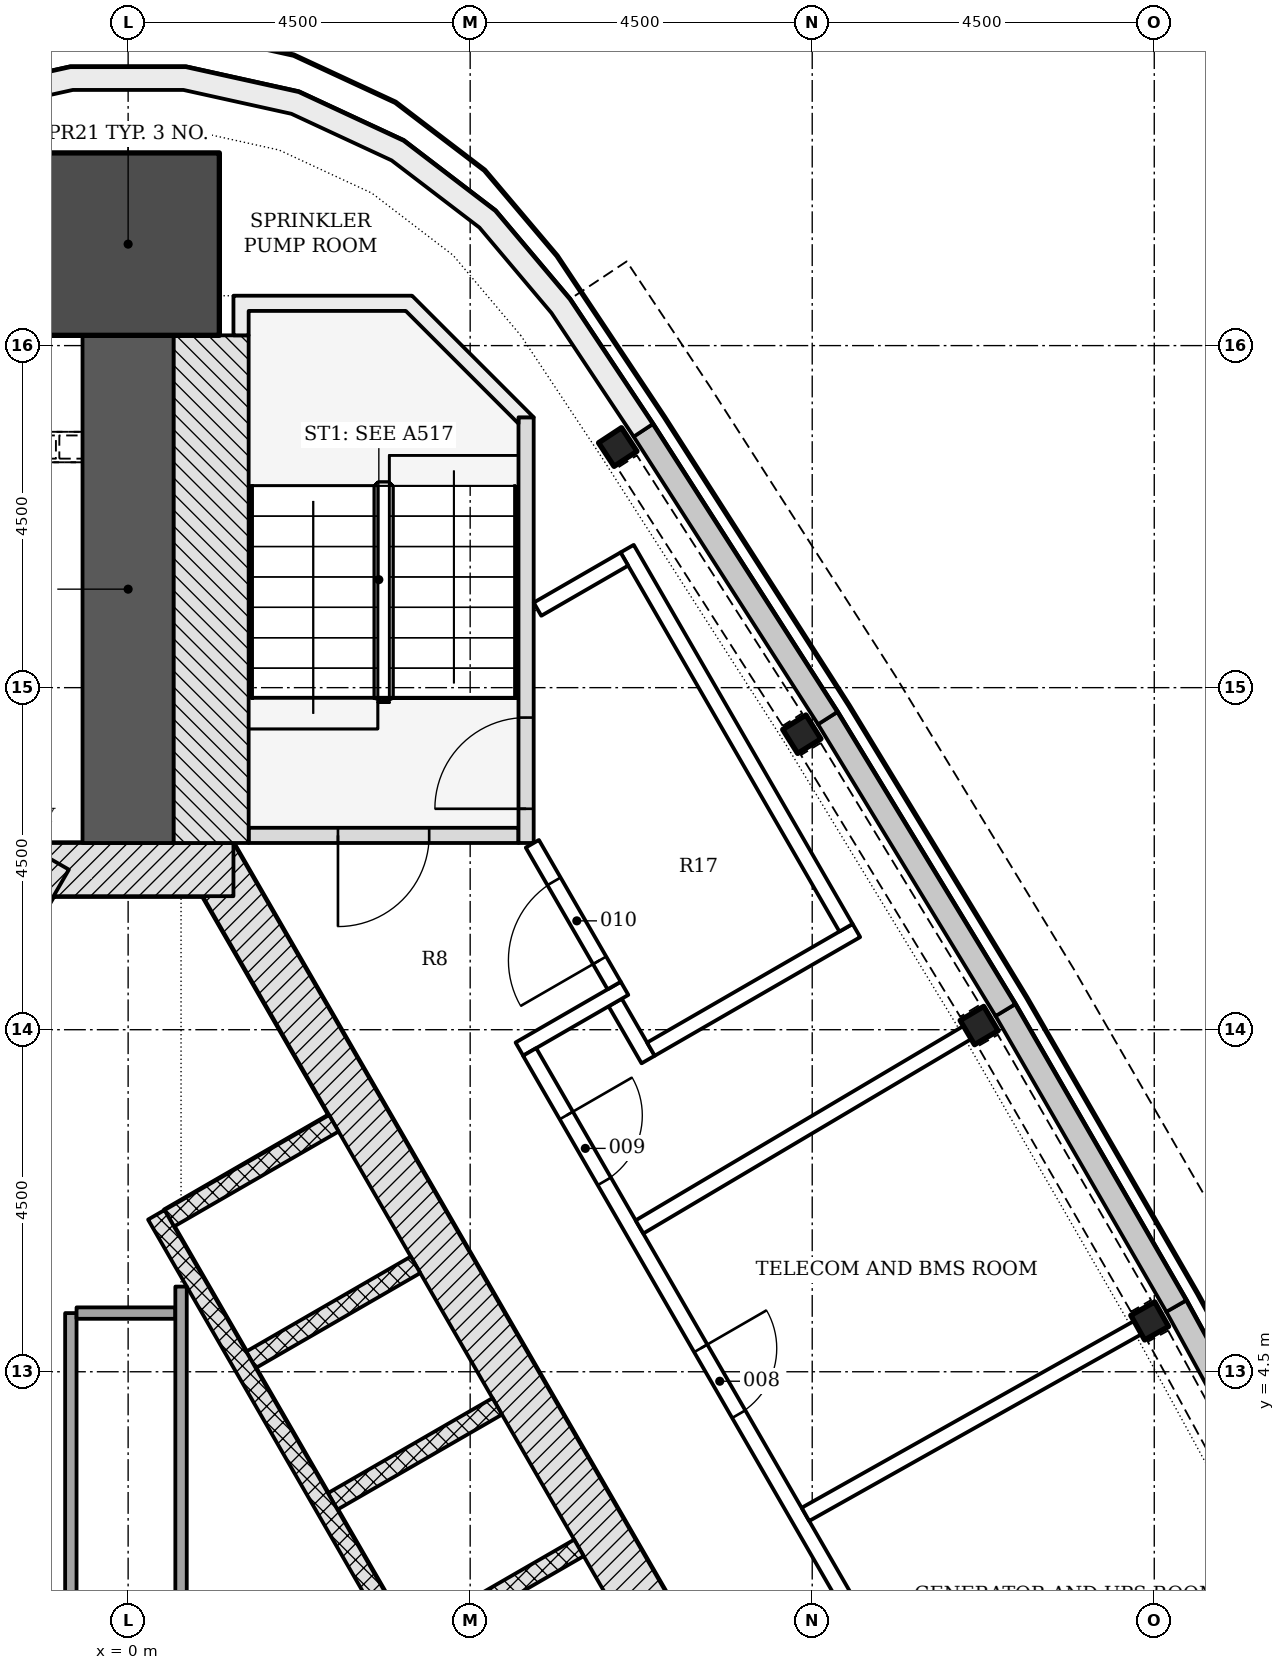
"""IFC4 building model, lengths in metres.
Left out: names, types, materials, properties, quantities, classifications, styles, units other than length and angle.
Written with IfcOpenShell. Run it as: python <this file> out.ifc"""

import sys

from ifc_helpers import new_model, si_unit, direction, frame, frame_2d, origin, origin_2d, place, context, subcontext, project, spatial, polyline, rectangle, i_section, outline, extrude, element, fill, save


model = new_model("IFC4")
c1 = context("Model", 3, precision=1e-05, world=origin(), true_north=direction((0.0, 1.0)))
c2 = subcontext(c1, "Body", "Model", "MODEL_VIEW")
j1 = project(units=[si_unit("LENGTHUNIT", "METRE"), si_unit("PLANEANGLEUNIT", "RADIAN")], contexts=[c1])
p1 = place(None, origin())
s1 = spatial("IfcSite", under=j1, at=p1, CompositionType="ELEMENT")
p2 = place(p1, origin())
s2 = spatial("IfcBuilding", under=s1, at=p2, CompositionType="ELEMENT")
p3 = place(p2, frame((0.0, 0.0, 258.0)))
s3 = spatial("IfcBuildingStorey", under=s2, at=p3, CompositionType="ELEMENT", Elevation=258.0)
p4 = place(p3, frame((10.311, -4.703, -0.3), z_axis=(0.0, 0.0, 1.0), x_axis=(-0.500001446645, 0.866024568562, 0.0)))
e1 = element("IfcWall", 1, at=p4, inside=s3, PredefinedType="SHEAR", context=c2, shape_type="SweptSolid", body=[
    extrude(rectangle(XDim=18.458, YDim=0.7, at=frame_2d((9.229, 0.0))), origin(), (0.0, 0.0, 1.0), 5.5),
])
p5 = place(p3, frame((1.386, 11.106, -0.3), z_axis=(0.0, 0.0, 1.0), x_axis=(-1.0, 0.0, 0.0)))
e2 = element("IfcWall", 2, at=p5, inside=s3, PredefinedType="SHEAR", context=c2, shape_type="SweptSolid", body=[
    extrude(rectangle(XDim=2.771, YDim=0.7, at=frame_2d((1.386, 0.0))), origin(), (0.0, 0.0, 1.0), 5.5),
])
p6 = place(p3, frame((-1.083, 11.281, -0.3), z_axis=(0.0, 0.0, 1.0), x_axis=(-0.500001446645, -0.866024568562, 0.0)))
e3 = element("IfcWall", 3, at=p6, inside=s3, PredefinedType="SHEAR", context=c2, shape_type="SweptSolid", body=[
    extrude(rectangle(XDim=18.458, YDim=0.7, at=frame_2d((9.229, 0.0))), origin(), (0.0, 0.0, 1.0), 5.5),
])
p7 = place(p6, frame((8.979, 0.0, 0.3)))
e4 = element("IfcOpeningElement", 4, at=p7, cuts=e3, PredefinedType="OPENING", context=c2, shape_type="SweptSolid", body=[
    extrude(rectangle(XDim=1.2, YDim=2.1, at=frame_2d((0.6, 1.05))), frame((0.0, 0.36, 0.0), z_axis=(0.0, -1.0, 0.0), x_axis=(1.0, 0.0, 0.0)), (0.0, 0.0, 1.0), 0.72),
])
p8 = place(p6, frame((11.029, 0.0, 0.3)))
e5 = element("IfcOpeningElement", 5, at=p8, cuts=e3, PredefinedType="OPENING", context=c2, shape_type="SweptSolid", body=[
    extrude(rectangle(XDim=1.2, YDim=2.1, at=frame_2d((0.6, 1.05))), frame((0.0, 0.36, 0.0), z_axis=(0.0, -1.0, 0.0), x_axis=(1.0, 0.0, 0.0)), (0.0, 0.0, 1.0), 0.72),
])
p9 = place(p3, frame((0.0, 11.456, -0.3), z_axis=(0.0, 0.0, 1.0), x_axis=(0.0, 1.0, 0.0)))
e6 = element("IfcWall", 6, at=p9, inside=s3, PredefinedType="SHEAR", context=c2, shape_type="SweptSolid", body=[
    extrude(rectangle(XDim=6.679, YDim=1.2, at=frame_2d((3.339, 0.0))), origin(), (0.0, 0.0, 1.0), 5.5),
])
p10 = place(p3, frame((0.0, 19.335, -0.3), z_axis=(0.0, 0.0, 1.0), x_axis=(0.0, 1.0, 0.0)))
e7 = element("IfcColumn", 7, at=p10, inside=s3, PredefinedType="COLUMN", context=c2, shape_type="SweptSolid", body=[
    extrude(rectangle(XDim=2.4, YDim=2.4, at=origin_2d()), origin(), (0.0, 0.0, 1.0), 5.5),
])
for number, where, z_axis, x_axis in (
    (8, (13.44, 5.169, -0.3), (0.0, 0.0, 1.0), (-0.49, 0.872, 0.0)),
    (9, (11.196, 9.055, -0.3), (0.0, 0.0, 1.0), (-0.51, 0.86, 0.0)),
    (10, (8.863, 12.888, -0.3), (0.0, 0.0, 1.0), (-0.53, 0.848, 0.0)),
    (11, (6.442, 16.666, -0.3), (0.0, 0.0, 1.0), (-0.549, 0.836, 0.0)),
):
    element("IfcColumn", number, at=place(p3, frame(where, z_axis=z_axis, x_axis=x_axis)), inside=s3, PredefinedType="COLUMN", context=c2, shape_type="SweptSolid", body=[
        extrude(i_section(OverallWidth=0.371, OverallDepth=0.361, WebThickness=0.012, FlangeThickness=0.02, FilletRadius=0.015, at=origin_2d()), origin(), (0.0, 0.0, 1.0), 5.5),
    ])
p11 = place(p3, origin())
e12 = element("IfcWall", 12, at=p11, inside=s3, PredefinedType="NOTDEFINED", context=c2, shape_type="SweptSolid", body=[
    extrude(outline(polyline([(16.078, 1.49), (13.919, 5.438), (13.656, 5.294), (15.815, 1.346), (16.078, 1.49)])), origin(), (0.0, 0.0, 1.0), 1.2),
])
p12 = place(p3, origin())
e13 = element("IfcWall", 13, at=p12, inside=s3, PredefinedType="NOTDEFINED", context=c2, shape_type="SweptSolid", body=[
    extrude(outline(polyline([(13.919, 5.438), (11.669, 9.335), (11.409, 9.185), (13.659, 5.288), (13.919, 5.438)])), origin(), (0.0, 0.0, 1.0), 1.2),
])
p13 = place(p3, origin())
e14 = element("IfcWall", 14, at=p13, inside=s3, PredefinedType="NOTDEFINED", context=c2, shape_type="SweptSolid", body=[
    extrude(outline(polyline([(11.669, 9.335), (9.33, 13.179), (9.073, 13.023), (11.413, 9.179), (11.669, 9.335)])), origin(), (0.0, 0.0, 1.0), 1.2),
])
p14 = place(p3, origin())
e15 = element("IfcWall", 15, at=p14, inside=s3, PredefinedType="NOTDEFINED", context=c2, shape_type="SweptSolid", body=[
    extrude(outline(polyline([(9.33, 13.179), (6.901, 16.968), (6.649, 16.806), (9.077, 13.017), (9.33, 13.179)])), origin(), (0.0, 0.0, 1.0), 1.2),
])
p15 = place(p3, origin())
e16 = element("IfcWall", 16, at=p15, inside=s3, PredefinedType="NOTDEFINED", context=c2, shape_type="SweptSolid", body=[
    extrude(outline(polyline([(6.901, 16.968), (5.81, 18.61), (4.83, 19.771), (3.623, 20.695), (2.244, 21.335), (0.76, 21.664), (-0.76, 21.664), (-2.244, 21.335), (-3.623, 20.695), (-4.83, 19.771), (-5.81, 18.61), (-5.58, 18.416), (-4.622, 19.553), (-3.466, 20.437), (-2.147, 21.05), (-0.727, 21.364), (0.727, 21.364), (2.147, 21.05), (3.466, 20.437), (4.622, 19.553), (5.569, 18.429), (6.651, 16.802), (6.901, 16.968)])), origin(), (0.0, 0.0, 1.0), 5.2),
])
p16 = place(p3, frame((5.931, 2.183, -0.3), z_axis=(0.0, 0.0, 1.0), x_axis=(-0.866047370643, -0.499961950354, 0.0)))
e17 = element("IfcWall", 17, at=p16, inside=s3, PredefinedType="PARTITIONING", context=c2, shape_type="SweptSolid", body=[
    extrude(rectangle(XDim=2.5, YDim=0.25, at=frame_2d((1.25, 0.0))), origin(), (0.0, 0.0, 1.0), 5.5),
])
for number, where, z_axis, x_axis in (
    (18, (4.856, 4.045, -0.3), (0.0, 0.0, 1.0), (-0.866, -0.5, 0.0)),
    (19, (3.781, 5.907, -0.3), (0.0, 0.0, 1.0), (-0.866, -0.5, 0.0)),
    (20, (2.706, 7.769, -0.3), (0.0, 0.0, 1.0), (-0.866, -0.5, 0.0)),
):
    element("IfcWall", number, at=place(p3, frame(where, z_axis=z_axis, x_axis=x_axis)), inside=s3, PredefinedType="PARTITIONING", context=c2, shape_type="SweptSolid", body=[
        extrude(rectangle(XDim=2.5, YDim=0.25, at=frame_2d((1.25, 0.0))), origin(), (0.0, 0.0, 1.0), 5.5),
    ])
p17 = place(p3, frame((5.87, -2.961, 0.0), z_axis=(0.0, 0.0, 1.0), x_axis=(-0.50000615651, 0.866021849293, 0.0)))
e21 = element("IfcWall", 21, at=p17, inside=s3, PredefinedType="PARTITIONING", context=c2, shape_type="SweptSolid", body=[
    extrude(rectangle(XDim=11.0, YDim=0.25, at=frame_2d((5.5, 0.0))), origin(), (0.0, 0.0, 1.0), 5.2),
])
p18 = place(p3, frame((-0.754, 5.272, 0.0), z_axis=(0.0, 0.0, 1.0), x_axis=(0.0, -1.0, 0.0)))
e22 = element("IfcWall", 22, at=p18, inside=s3, PredefinedType="PARTITIONING", context=c2, shape_type="SweptSolid", body=[
    extrude(rectangle(XDim=11.5, YDim=0.15, at=frame_2d((5.75, 0.0))), origin(), (0.0, 0.0, 1.0), 5.2),
])
p19 = place(p18, frame((3.701, 0.0, 0.0)))
e23 = element("IfcOpeningElement", 23, at=p19, cuts=e22, PredefinedType="OPENING", context=c2, shape_type="SweptSolid", body=[
    extrude(rectangle(XDim=0.9, YDim=2.1, at=frame_2d((0.45, 1.05))), frame((0.0, 0.085, 0.0), z_axis=(0.0, -1.0, 0.0), x_axis=(1.0, 0.0, 0.0)), (0.0, 0.0, 1.0), 0.17),
])
p20 = place(p3, frame((-0.679, 5.272, 0.0), z_axis=(0.0, 0.0, 1.0), x_axis=(1.0, 0.0, 0.0)))
e24 = element("IfcWall", 24, at=p20, inside=s3, PredefinedType="PARTITIONING", context=c2, shape_type="SweptSolid", body=[
    extrude(rectangle(XDim=1.3, YDim=0.15, at=frame_2d((0.65, 0.0))), origin(), (0.0, 0.0, 1.0), 5.2),
])
p21 = place(p3, frame((0.696, -5.928, 0.0), z_axis=(0.0, 0.0, 1.0), x_axis=(0.0, 1.0, 0.0)))
e25 = element("IfcWall", 25, at=p21, inside=s3, PredefinedType="PARTITIONING", context=c2, shape_type="SweptSolid", body=[
    extrude(rectangle(XDim=11.549, YDim=0.15, at=frame_2d((5.774, 0.0))), origin(), (0.0, 0.0, 1.0), 5.2),
])
p22 = place(p21, frame((6.6, 0.0, 0.0)))
e26 = element("IfcOpeningElement", 26, at=p22, cuts=e25, PredefinedType="OPENING", context=c2, shape_type="SweptSolid", body=[
    extrude(rectangle(XDim=0.9, YDim=2.1, at=frame_2d((0.45, 1.05))), frame((0.0, 0.085, 0.0), z_axis=(0.0, -1.0, 0.0), x_axis=(1.0, 0.0, 0.0)), (0.0, 0.0, 1.0), 0.17),
])
p23 = place(p3, frame((5.135, 11.556, -0.3), z_axis=(0.0, 0.0, 1.0), x_axis=(-1.0, 0.0, 0.0)))
e27 = element("IfcWall", 27, at=p23, inside=s3, PredefinedType="SHEAR", context=c2, shape_type="SweptSolid", body=[
    extrude(rectangle(XDim=3.55, YDim=0.2, at=frame_2d((1.775, 0.0))), origin(), (0.0, 0.0, 1.0), 5.5),
])
p24 = place(p23, frame((1.175, 0.0, 0.3)))
e28 = element("IfcOpeningElement", 28, at=p24, cuts=e27, PredefinedType="OPENING", context=c2, shape_type="SweptSolid", body=[
    extrude(rectangle(XDim=1.2, YDim=2.1, at=frame_2d((0.6, 1.05))), frame((0.0, 0.11, 0.0), z_axis=(0.0, -1.0, 0.0), x_axis=(1.0, 0.0, 0.0)), (0.0, 0.0, 1.0), 0.22),
])
p25 = place(p3, frame((5.236, 11.456, -0.3), z_axis=(0.0, 0.0, 1.0), x_axis=(0.0, 1.0, 0.0)))
e29 = element("IfcWall", 29, at=p25, inside=s3, PredefinedType="SHEAR", context=c2, shape_type="SweptSolid", body=[
    extrude(rectangle(XDim=5.6, YDim=0.2, at=frame_2d((2.8, 0.0))), origin(), (0.0, 0.0, 1.0), 5.5),
])
p26 = place(p25, frame((0.45, 0.0, 0.3)))
e30 = element("IfcOpeningElement", 30, at=p26, cuts=e29, PredefinedType="OPENING", context=c2, shape_type="SweptSolid", body=[
    extrude(rectangle(XDim=1.2, YDim=2.1, at=frame_2d((0.6, 1.05))), frame((0.0, 0.11, 0.0), z_axis=(0.0, -1.0, 0.0), x_axis=(1.0, 0.0, 0.0)), (0.0, 0.0, 1.0), 0.22),
])
p27 = place(p3, frame((1.093, 11.456, -0.3), z_axis=(0.0, 0.0, 1.0), x_axis=(0.0, 1.0, 0.0)))
e31 = element("IfcWall", 31, at=p27, inside=s3, PredefinedType="SHEAR", context=c2, shape_type="SweptSolid", body=[
    extrude(rectangle(XDim=6.679, YDim=0.986, at=frame_2d((3.339, 0.0))), origin(), (0.0, 0.0, 1.0), 5.5),
])
p28 = place(p3, frame((0.0, 0.0, -0.3)))
e32 = element("IfcWall", 32, at=p28, inside=s3, PredefinedType="SHEAR", context=c2, shape_type="SweptSolid", body=[
    extrude(outline(polyline([(5.336, 17.056), (3.736, 18.656), (1.385, 18.656), (1.385, 18.135), (1.586, 18.135), (1.586, 18.456), (3.653, 18.456), (5.135, 16.974), (5.135, 17.056), (5.135, 17.056), (5.135, 17.056), (5.135, 17.056), (5.135, 17.056), (5.135, 17.056), (5.135, 17.056), (5.135, 17.056), (5.135, 17.056), (5.135, 17.056), (5.135, 17.056), (5.135, 17.056), (5.135, 17.056), (5.135, 17.056), (5.135, 17.056), (5.135, 17.056), (5.135, 17.056), (5.336, 17.056)])), origin(), (0.0, 0.0, 1.0), 5.5),
])
p29 = place(p3, frame((6.408, 9.358, 0.0), z_axis=(0.0, 0.0, 1.0), x_axis=(0.499958279983, -0.866049489508, 0.0)))
e33 = element("IfcWall", 33, at=p29, inside=s3, PredefinedType="PARTITIONING", context=c2, shape_type="SweptSolid", body=[
    extrude(rectangle(XDim=0.866, YDim=0.2, at=frame_2d((0.433, 0.0))), origin(), (0.0, 0.0, 1.0), 5.2),
])
p30 = place(p3, frame((5.147, 8.745, 0.0), z_axis=(0.0, 0.0, 1.0), x_axis=(0.865987117328, 0.500066308224, 0.0)))
e34 = element("IfcWall", 34, at=p30, inside=s3, PredefinedType="PARTITIONING", context=c2, shape_type="SweptSolid", body=[
    extrude(rectangle(XDim=1.598, YDim=0.2, at=frame_2d((0.799, 0.0))), origin(), (0.0, 0.0, 1.0), 5.2),
])
p31 = place(p3, frame((6.395, 9.581, 0.0), z_axis=(0.0, 0.0, 1.0), x_axis=(-0.500003735859, 0.866023246874, 0.0)))
e35 = element("IfcWall", 35, at=p31, inside=s3, PredefinedType="PARTITIONING", context=c2, shape_type="SweptSolid", body=[
    extrude(rectangle(XDim=2.154, YDim=0.2, at=frame_2d((1.077, 0.0))), origin(), (0.0, 0.0, 1.0), 4.652),
])
p32 = place(p31, frame((0.383, 0.0, 0.0)))
e36 = element("IfcOpeningElement", 36, at=p32, cuts=e35, PredefinedType="OPENING", context=c2, shape_type="SweptSolid", body=[
    extrude(rectangle(XDim=1.2, YDim=2.1, at=frame_2d((0.6, 1.05))), frame((0.0, 0.11, 0.0), z_axis=(0.0, -1.0, 0.0), x_axis=(1.0, 0.0, 0.0)), (0.0, 0.0, 1.0), 0.22),
])
p33 = place(p3, frame((5.282, 8.708, 0.0), z_axis=(0.0, 0.0, 1.0), x_axis=(0.500007704848, -0.866020955343, 0.0)))
e37 = element("IfcWall", 37, at=p33, inside=s3, PredefinedType="PARTITIONING", context=c2, shape_type="SweptSolid", body=[
    extrude(rectangle(XDim=18.991, YDim=0.2, at=frame_2d((9.496, 0.0))), origin(), (0.0, 0.0, 1.0), 4.652),
])
p34 = place(p33, frame((12.521, 0.0, 0.0)))
e38 = element("IfcOpeningElement", 38, at=p34, cuts=e37, PredefinedType="OPENING", context=c2, shape_type="SweptSolid", body=[
    extrude(rectangle(XDim=1.0, YDim=2.1, at=frame_2d((0.5, 1.05))), frame((0.0, 0.11, 0.0), z_axis=(0.0, -1.0, 0.0), x_axis=(1.0, 0.0, 0.0)), (0.0, 0.0, 1.0), 0.22),
])
p35 = place(p33, frame((4.502, 0.0, 0.0)))
e39 = element("IfcOpeningElement", 39, at=p35, cuts=e37, PredefinedType="OPENING", context=c2, shape_type="SweptSolid", body=[
    extrude(rectangle(XDim=1.0, YDim=2.1, at=frame_2d((0.5, 1.05))), frame((0.0, 0.11, 0.0), z_axis=(0.0, -1.0, 0.0), x_axis=(1.0, 0.0, 0.0)), (0.0, 0.0, 1.0), 0.22),
])
p36 = place(p33, frame((0.965, 0.0, 0.0)))
e40 = element("IfcOpeningElement", 40, at=p36, cuts=e37, PredefinedType="OPENING", context=c2, shape_type="SweptSolid", body=[
    extrude(rectangle(XDim=1.0, YDim=2.1, at=frame_2d((0.5, 1.05))), frame((0.0, 0.11, 0.0), z_axis=(0.0, -1.0, 0.0), x_axis=(1.0, 0.0, 0.0)), (0.0, 0.0, 1.0), 0.22),
])
for number, where, z_axis, x_axis in (
    (41, (8.911, 2.624, 0.0), (0.0, 0.0, 1.0), (0.872, 0.49, 0.0)),
    (42, (6.728, 6.406, 0.0), (0.0, 0.0, 1.0), (0.86, 0.51, 0.0)),
):
    element("IfcWall", number, at=place(p3, frame(where, z_axis=z_axis, x_axis=x_axis)), inside=s3, PredefinedType="PARTITIONING", context=c2, shape_type="SweptSolid", body=[
        extrude(rectangle(XDim=5.044, YDim=0.2, at=frame_2d((2.522, 0.0))), origin(), (0.0, 0.0, 1.0), 4.652),
    ])
p37 = place(p3, frame((6.878, 8.744, 0.0), z_axis=(0.0, 0.0, 1.0), x_axis=(0.866025387892, 0.500000027526, 0.0)))
e43 = element("IfcWall", 43, at=p37, inside=s3, PredefinedType="PARTITIONING", context=c2, shape_type="SweptSolid", body=[
    extrude(rectangle(XDim=3.122, YDim=0.2, at=frame_2d((1.561, 0.0))), origin(), (0.0, 0.0, 1.0), 5.2),
])
p38 = place(p3, frame((9.445, 10.341, 0.0), z_axis=(0.0, 0.0, 1.0), x_axis=(-0.499996461177, 0.866027446915, 0.0)))
e44 = element("IfcWall", 44, at=p38, inside=s3, PredefinedType="PARTITIONING", context=c2, shape_type="SweptSolid", body=[
    extrude(rectangle(XDim=5.759, YDim=0.2, at=frame_2d((2.879, 0.0))), origin(), (0.0, 0.0, 1.0), 4.652),
])
p39 = place(p3, frame((6.529, 15.192, 0.0), z_axis=(0.0, 0.0, 1.0), x_axis=(-0.866117824122, -0.499839889103, 0.0)))
e45 = element("IfcWall", 45, at=p39, inside=s3, PredefinedType="PARTITIONING", context=c2, shape_type="SweptSolid", body=[
    extrude(rectangle(XDim=1.32, YDim=0.2, at=frame_2d((0.66, 0.0))), origin(), (0.0, 0.0, 1.0), 5.2),
])
p40 = place(p24, origin())
e46 = element("IfcDoor", 46, at=p40, inside=s3, OperationType="SINGLE_SWING_RIGHT", PredefinedType="DOOR", context=c2, shape_type="SweptSolid", body=[
    extrude(rectangle(XDim=1.2, YDim=2.1, at=frame_2d((0.6, 1.05))), frame((0.0, 0.025, 0.0), z_axis=(0.0, -1.0, 0.0), x_axis=(1.0, 0.0, 0.0)), (0.0, 0.0, 1.0), 0.05),
])
fill(e28, e46)
p41 = place(p26, origin())
e47 = element("IfcDoor", 47, at=p41, inside=s3, OperationType="SINGLE_SWING_LEFT", PredefinedType="DOOR", context=c2, shape_type="SweptSolid", body=[
    extrude(rectangle(XDim=1.2, YDim=2.1, at=frame_2d((0.6, 1.05))), frame((0.0, 0.025, 0.0), z_axis=(0.0, -1.0, 0.0), x_axis=(1.0, 0.0, 0.0)), (0.0, 0.0, 1.0), 0.05),
])
fill(e30, e47)
p42 = place(p35, origin())
e48 = element("IfcDoor", 48, at=p42, inside=s3, OperationType="SINGLE_SWING_LEFT", PredefinedType="DOOR", context=c2, shape_type="SweptSolid", body=[
    extrude(rectangle(XDim=1.0, YDim=2.1, at=frame_2d((0.5, 1.05))), frame((0.0, 0.025, 0.0), z_axis=(0.0, -1.0, 0.0), x_axis=(1.0, 0.0, 0.0)), (0.0, 0.0, 1.0), 0.05),
])
fill(e39, e48)
p43 = place(p36, origin())
e49 = element("IfcDoor", 49, at=p43, inside=s3, OperationType="SINGLE_SWING_LEFT", PredefinedType="DOOR", context=c2, shape_type="SweptSolid", body=[
    extrude(rectangle(XDim=1.0, YDim=2.1, at=frame_2d((0.5, 1.05))), frame((0.0, 0.025, 0.0), z_axis=(0.0, -1.0, 0.0), x_axis=(1.0, 0.0, 0.0)), (0.0, 0.0, 1.0), 0.05),
])
fill(e40, e49)
p44 = place(p32, origin())
e50 = element("IfcDoor", 50, at=p44, inside=s3, OperationType="SINGLE_SWING_LEFT", PredefinedType="DOOR", context=c2, shape_type="SweptSolid", body=[
    extrude(rectangle(XDim=1.2, YDim=2.1, at=frame_2d((0.6, 1.05))), frame((0.0, 0.025, 0.0), z_axis=(0.0, -1.0, 0.0), x_axis=(1.0, 0.0, 0.0)), (0.0, 0.0, 1.0), 0.05),
])
fill(e36, e50)
save(model, sys.argv[1])
